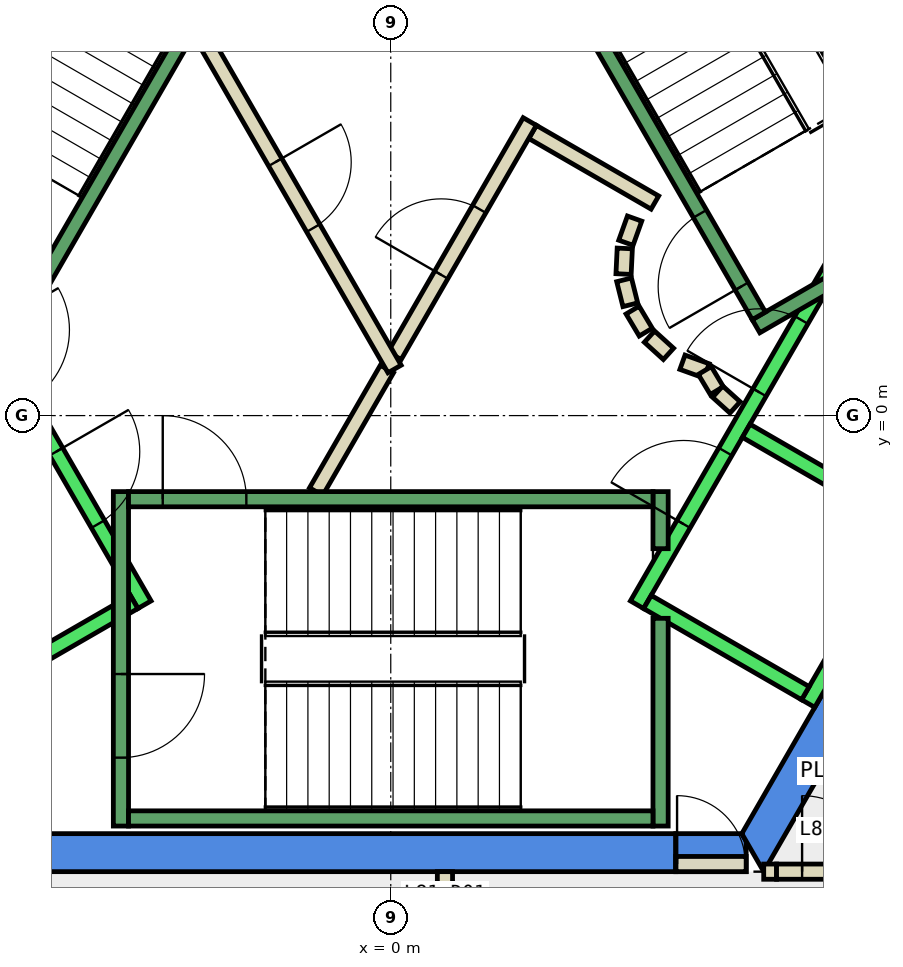
"""IFC4 building model, lengths in metres.
Left out: names, types, materials, properties, quantities, classifications, styles, units other than length and angle.
Written with IfcOpenShell. Run it as: python <this file> out.ifc"""

import sys

from ifc_helpers import new_model, si_unit, direction, frame, frame_2d, origin, place, context, subcontext, project, spatial, polyline, rectangle, outline, extrude, element, fill, save


model = new_model("IFC4")
c1 = context("Model", 3, precision=1e-05, world=origin(), true_north=direction((0.0, 1.0)))
c2 = subcontext(c1, "Body", "Model", "MODEL_VIEW")
j1 = project(units=[si_unit("LENGTHUNIT", "METRE"), si_unit("PLANEANGLEUNIT", "RADIAN")], contexts=[c1])
p1 = place(None, origin())
s1 = spatial("IfcSite", under=j1, at=p1, CompositionType="ELEMENT")
p2 = place(p1, origin())
s2 = spatial("IfcBuilding", under=s1, at=p2, CompositionType="ELEMENT")
p3 = place(p2, frame((0.0, 0.0, 344.9)))
s3 = spatial("IfcBuildingStorey", under=s2, at=p3, CompositionType="ELEMENT", Elevation=344.9)
p4 = place(p3, frame((0.0, 0.0, -0.35)))
e1 = element("IfcWall", 1, at=p4, inside=s3, PredefinedType="SHEAR", context=c2, shape_type="SweptSolid", body=[
    extrude(outline(polyline([(5.486, 9.998), (5.053, 9.748), (9.238, 2.5), (9.815, 2.5), (5.486, 9.998)])), origin(), (0.0, 0.0, 1.0), 4.4),
])
p5 = place(p3, frame((0.0, 0.0, -0.35)))
e2 = element("IfcWall", 2, at=p5, inside=s3, PredefinedType="SHEAR", context=c2, shape_type="SweptSolid", body=[
    extrude(outline(polyline([(3.75, -6.0), (3.75, -5.5), (-4.619, -5.5), (-4.907, -6.0), (3.75, -6.0)])), origin(), (0.0, 0.0, 1.0), 4.4),
])
p6 = place(p3, frame((0.0, 0.0, 3.6)))
e3 = element("IfcWall", 3, at=p6, inside=s3, PredefinedType="SHEAR", context=c2, shape_type="SweptSolid", body=[
    extrude(outline(polyline([(4.676, -6.0), (4.676, -5.6), (4.619, -5.5), (3.75, -5.5), (3.75, -6.0), (4.676, -6.0)])), origin(), (0.0, 0.0, 1.0), 0.45),
])
p7 = place(p3, frame((0.0, 0.0, -0.35)))
e4 = element("IfcWall", 4, at=p7, inside=s3, PredefinedType="SHEAR", context=c2, shape_type="SweptSolid", body=[
    extrude(outline(polyline([(4.907, -6.0), (9.815, 2.5), (9.238, 2.5), (4.619, -5.5), (4.907, -6.0)])), origin(), (0.0, 0.0, 1.0), 4.4),
])
p8 = place(p3, frame((-0.982, -1.0, 0.0), z_axis=(0.0, 0.0, 1.0), x_axis=(0.50024047865, 0.865886518847, 0.0)))
e5 = element("IfcWall", 5, at=p8, inside=s3, PredefinedType="PARTITIONING", context=c2, shape_type="SweptSolid", body=[
    extrude(rectangle(XDim=1.863, YDim=0.2, at=frame_2d((0.931, 0.0))), origin(), (0.0, 0.0, 1.0), 4.05),
])
p9 = place(p3, frame((1.866, 3.732, 0.0), z_axis=(0.0, 0.0, 1.0), x_axis=(0.866043361281, -0.499968895414, 0.0)))
e6 = element("IfcWall", 6, at=p9, inside=s3, PredefinedType="PARTITIONING", context=c2, shape_type="SweptSolid", body=[
    extrude(rectangle(XDim=1.858, YDim=0.2, at=frame_2d((0.929, 0.0))), origin(), (0.0, 0.0, 1.0), 4.05),
])
p10 = place(p3, frame((3.208, 2.592, 0.0), z_axis=(0.0, 0.0, 1.0), x_axis=(-0.337388820924, -0.941365382578, 0.0)))
e7 = element("IfcWall", 7, at=p10, inside=s3, PredefinedType="PARTITIONING", context=c2, shape_type="SweptSolid", body=[
    extrude(rectangle(XDim=0.338, YDim=0.2, at=frame_2d((0.169, 0.0))), origin(), (0.0, 0.0, 1.0), 4.05),
])
p11 = place(p3, frame((3.079, 2.199, 0.0), z_axis=(0.0, 0.0, 1.0), x_axis=(-0.047771483479, -0.998858290933, 0.0)))
e8 = element("IfcWall", 8, at=p11, inside=s3, PredefinedType="PARTITIONING", context=c2, shape_type="SweptSolid", body=[
    extrude(rectangle(XDim=0.337, YDim=0.2, at=frame_2d((0.169, 0.0))), origin(), (0.0, 0.0, 1.0), 4.05),
])
p12 = place(p3, frame((3.07, 1.786, 0.0), z_axis=(0.0, 0.0, 1.0), x_axis=(0.242705583207, -0.970099994784, 0.0)))
e9 = element("IfcWall", 9, at=p12, inside=s3, PredefinedType="PARTITIONING", context=c2, shape_type="SweptSolid", body=[
    extrude(rectangle(XDim=0.338, YDim=0.2, at=frame_2d((0.169, 0.0))), origin(), (0.0, 0.0, 1.0), 4.05),
])
for number, where, z_axis, x_axis in (
    (10, (3.182, 1.388, 0.0), (0.0, 0.0, 1.0), (0.512, -0.859, 0.0)),
    (11, (3.404, 1.039, 0.0), (0.0, 0.0, 1.0), (0.74, -0.672, 0.0)),
):
    element("IfcWall", number, at=place(p3, frame(where, z_axis=z_axis, x_axis=x_axis)), inside=s3, PredefinedType="PARTITIONING", context=c2, shape_type="SweptSolid", body=[
        extrude(rectangle(XDim=0.338, YDim=0.2, at=frame_2d((0.169, 0.0))), origin(), (0.0, 0.0, 1.0), 4.05),
    ])
p13 = place(p3, frame((3.838, 0.702, 0.0), z_axis=(0.0, 0.0, 1.0), x_axis=(0.941035081519, -0.338308993895, 0.0)))
e12 = element("IfcWall", 12, at=p13, inside=s3, PredefinedType="PARTITIONING", context=c2, shape_type="SweptSolid", body=[
    extrude(rectangle(XDim=0.337, YDim=0.2, at=frame_2d((0.168, 0.0))), origin(), (0.0, 0.0, 1.0), 4.05),
])
p14 = place(p3, frame((4.132, 0.593, 0.0), z_axis=(0.0, 0.0, 1.0), x_axis=(0.513561617048, -0.858052717201, 0.0)))
e13 = element("IfcWall", 13, at=p14, inside=s3, PredefinedType="PARTITIONING", context=c2, shape_type="SweptSolid", body=[
    extrude(rectangle(XDim=0.308, YDim=0.2, at=frame_2d((0.154, 0.0))), origin(), (0.0, 0.0, 1.0), 4.05),
])
p15 = place(p3, frame((4.301, 0.315, 0.0), z_axis=(0.0, 0.0, 1.0), x_axis=(0.741798017506, -0.670623367639, 0.0)))
e14 = element("IfcWall", 14, at=p15, inside=s3, PredefinedType="PARTITIONING", context=c2, shape_type="SweptSolid", body=[
    extrude(rectangle(XDim=0.309, YDim=0.2, at=frame_2d((0.154, 0.0))), origin(), (0.0, 0.0, 1.0), 4.05),
])
p16 = place(p3, frame((0.05, 0.787, 0.0), z_axis=(0.0, 0.0, 1.0), x_axis=(0.499954076797, 0.866051915934, 0.0)))
e15 = element("IfcWall", 15, at=p16, inside=s3, PredefinedType="PARTITIONING", context=c2, shape_type="SweptSolid", body=[
    extrude(rectangle(XDim=3.558, YDim=0.2, at=frame_2d((1.779, 0.0))), origin(), (0.0, 0.0, 1.0), 4.05),
])
p17 = place(p16, frame((1.229, 0.0, 0.0)))
e16 = element("IfcOpeningElement", 16, at=p17, cuts=e15, PredefinedType="OPENING", context=c2, shape_type="SweptSolid", body=[
    extrude(rectangle(XDim=1.0, YDim=2.1, at=frame_2d((0.5, 1.05))), frame((0.0, 0.11, 0.0), z_axis=(0.0, -1.0, 0.0), x_axis=(1.0, 0.0, 0.0)), (0.0, 0.0, 1.0), 0.22),
])
p18 = place(p3, frame((-2.54, 5.1, 0.0), z_axis=(0.0, 0.0, 1.0), x_axis=(0.499925051871, -0.866068670783, 0.0)))
e17 = element("IfcWall", 17, at=p18, inside=s3, PredefinedType="PARTITIONING", context=c2, shape_type="SweptSolid", body=[
    extrude(rectangle(XDim=5.181, YDim=0.2, at=frame_2d((2.59, 0.0))), origin(), (0.0, 0.0, 1.0), 4.05),
])
p19 = place(p18, frame((2.04, 0.0, 0.0)))
e18 = element("IfcOpeningElement", 18, at=p19, cuts=e17, PredefinedType="OPENING", context=c2, shape_type="SweptSolid", body=[
    extrude(rectangle(XDim=1.0, YDim=2.1, at=frame_2d((0.5, 1.05))), frame((0.0, 0.11, 0.0), z_axis=(0.0, -1.0, 0.0), x_axis=(1.0, 0.0, 0.0)), (0.0, 0.0, 1.0), 0.22),
])
p20 = place(p3, frame((0.713, -7.9, 0.0), z_axis=(0.0, 0.0, 1.0), x_axis=(0.0, 1.0, 0.0)))
e19 = element("IfcWall", 19, at=p20, inside=s3, PredefinedType="PARTITIONING", context=c2, shape_type="SweptSolid", body=[
    extrude(rectangle(XDim=1.9, YDim=0.2, at=frame_2d((0.95, 0.0))), origin(), (0.0, 0.0, 1.0), 4.05),
])
p21 = place(p20, frame((0.3, 0.0, 0.0)))
e20 = element("IfcOpeningElement", 20, at=p21, cuts=e19, PredefinedType="OPENING", context=c2, shape_type="SweptSolid", body=[
    extrude(rectangle(XDim=1.0, YDim=2.1, at=frame_2d((0.5, 1.05))), frame((0.0, 0.11, 0.0), z_axis=(0.0, -1.0, 0.0), x_axis=(1.0, 0.0, 0.0)), (0.0, 0.0, 1.0), 0.22),
])
p22 = place(p3, frame((4.907, -6.0, 0.0), z_axis=(0.0, 0.0, 1.0), x_axis=(1.0, 0.0, 0.0)))
e21 = element("IfcWall", 21, at=p22, inside=s3, PredefinedType="PARTITIONING", context=c2, shape_type="SweptSolid", body=[
    extrude(rectangle(XDim=0.169, YDim=0.2, at=frame_2d((0.084, 0.0))), origin(), (0.0, 0.0, 1.0), 2.4),
])
p23 = place(p3, frame((3.75, -5.9, 0.0), z_axis=(0.0, 0.0, 1.0), x_axis=(1.0, 0.0, 0.0)))
e22 = element("IfcWall", 22, at=p23, inside=s3, PredefinedType="PARTITIONING", context=c2, shape_type="SweptSolid", body=[
    extrude(rectangle(XDim=0.926, YDim=0.2, at=frame_2d((0.463, 0.0))), origin(), (0.0, 0.0, 1.0), 2.4),
])
p24 = place(p23, frame((0.017, 0.0, 0.0)))
e23 = element("IfcOpeningElement", 23, at=p24, cuts=e22, PredefinedType="OPENING", context=c2, shape_type="SweptSolid", body=[
    extrude(rectangle(XDim=0.9, YDim=2.1, at=frame_2d((0.45, 1.05))), frame((0.0, 0.11, 0.0), z_axis=(0.0, -1.0, 0.0), x_axis=(1.0, 0.0, 0.0)), (0.0, 0.0, 1.0), 0.22),
])
p25 = place(p3, frame((5.076, -6.0, 0.0), z_axis=(0.0, 0.0, 1.0), x_axis=(1.0, 0.0, 0.0)))
e24 = element("IfcWall", 24, at=p25, inside=s3, PredefinedType="PARTITIONING", context=c2, shape_type="SweptSolid", body=[
    extrude(rectangle(XDim=1.887, YDim=0.2, at=frame_2d((0.943, 0.0))), origin(), (0.0, 0.0, 1.0), 4.05),
])
p26 = place(p25, frame((0.336, 0.0, 0.0)))
e25 = element("IfcOpeningElement", 25, at=p26, cuts=e24, PredefinedType="OPENING", context=c2, shape_type="SweptSolid", body=[
    extrude(rectangle(XDim=1.0, YDim=2.1, at=frame_2d((0.5, 1.05))), frame((0.0, 0.11, 0.0), z_axis=(0.0, -1.0, 0.0), x_axis=(1.0, 0.0, 0.0)), (0.0, 0.0, 1.0), 0.22),
])
p27 = place(p3, frame((-5.94, 2.188, 0.0), z_axis=(0.0, 0.0, 1.0), x_axis=(0.500034260056, -0.866005622828, 0.0)))
e26 = element("IfcWall", 26, at=p27, inside=s3, PredefinedType="STANDARD", context=c2, shape_type="SweptSolid", body=[
    extrude(rectangle(XDim=5.399, YDim=0.2, at=frame_2d((2.7, 0.0))), origin(), (0.0, 0.0, 1.0), 4.05),
])
p28 = place(p27, frame((3.075, 0.0, 0.0)))
e27 = element("IfcOpeningElement", 27, at=p28, cuts=e26, PredefinedType="OPENING", context=c2, shape_type="SweptSolid", body=[
    extrude(rectangle(XDim=1.1, YDim=2.1, at=frame_2d((0.55, 1.05))), frame((0.0, 0.11, 0.0), z_axis=(0.0, -1.0, 0.0), x_axis=(1.0, 0.0, 0.0)), (0.0, 0.0, 1.0), 0.22),
])
p29 = place(p27, frame((1.225, 0.0, 0.0)))
e28 = element("IfcOpeningElement", 28, at=p29, cuts=e26, PredefinedType="OPENING", context=c2, shape_type="SweptSolid", body=[
    extrude(rectangle(XDim=1.1, YDim=2.1, at=frame_2d((0.55, 1.05))), frame((0.0, 0.11, 0.0), z_axis=(0.0, -1.0, 0.0), x_axis=(1.0, 0.0, 0.0)), (0.0, 0.0, 1.0), 0.22),
])
p30 = place(p3, frame((-3.377, -2.452, 0.0), z_axis=(0.0, 0.0, 1.0), x_axis=(-0.865955154139, -0.50012165622, 0.0)))
e29 = element("IfcWall", 29, at=p30, inside=s3, PredefinedType="STANDARD", context=c2, shape_type="SweptSolid", body=[
    extrude(rectangle(XDim=2.4, YDim=0.2, at=frame_2d((1.2, 0.0))), origin(), (0.0, 0.0, 1.0), 4.05),
])
p31 = place(p3, frame((3.24, -2.488, 0.0), z_axis=(0.0, 0.0, 1.0), x_axis=(0.500034260056, 0.866005622828, 0.0)))
e30 = element("IfcWall", 30, at=p31, inside=s3, PredefinedType="STANDARD", context=c2, shape_type="SweptSolid", body=[
    extrude(rectangle(XDim=5.399, YDim=0.2, at=frame_2d((2.7, 0.0))), origin(), (0.0, 0.0, 1.0), 4.05),
])
p32 = place(p31, frame((3.225, 0.0, 0.0)))
e31 = element("IfcOpeningElement", 31, at=p32, cuts=e30, PredefinedType="OPENING", context=c2, shape_type="SweptSolid", body=[
    extrude(rectangle(XDim=1.1, YDim=2.1, at=frame_2d((0.55, 1.05))), frame((0.0, 0.11, 0.0), z_axis=(0.0, -1.0, 0.0), x_axis=(1.0, 0.0, 0.0)), (0.0, 0.0, 1.0), 0.22),
])
p33 = place(p31, frame((1.225, 0.0, 0.0)))
e32 = element("IfcOpeningElement", 32, at=p33, cuts=e30, PredefinedType="OPENING", context=c2, shape_type="SweptSolid", body=[
    extrude(rectangle(XDim=1.1, YDim=2.1, at=frame_2d((0.55, 1.05))), frame((0.0, 0.11, 0.0), z_axis=(0.0, -1.0, 0.0), x_axis=(1.0, 0.0, 0.0)), (0.0, 0.0, 1.0), 0.22),
])
p34 = place(p3, frame((5.492, -3.788, 0.0), z_axis=(0.0, 0.0, 1.0), x_axis=(0.500034260056, 0.866005622828, 0.0)))
e33 = element("IfcWall", 33, at=p34, inside=s3, PredefinedType="STANDARD", context=c2, shape_type="SweptSolid", body=[
    extrude(rectangle(XDim=5.399, YDim=0.2, at=frame_2d((2.7, 0.0))), origin(), (0.0, 0.0, 1.0), 4.05),
])
p35 = place(p3, frame((3.377, -2.452, 0.0), z_axis=(0.0, 0.0, 1.0), x_axis=(0.865955154139, -0.50012165622, 0.0)))
e34 = element("IfcWall", 34, at=p35, inside=s3, PredefinedType="STANDARD", context=c2, shape_type="SweptSolid", body=[
    extrude(rectangle(XDim=2.4, YDim=0.2, at=frame_2d((1.2, 0.0))), origin(), (0.0, 0.0, 1.0), 4.05),
])
p36 = place(p3, frame((4.677, -0.2, 0.0), z_axis=(0.0, 0.0, 1.0), x_axis=(0.865973769406, -0.500089422704, 0.0)))
e35 = element("IfcWall", 35, at=p36, inside=s3, PredefinedType="STANDARD", context=c2, shape_type="SweptSolid", body=[
    extrude(rectangle(XDim=2.399, YDim=0.2, at=frame_2d((1.2, 0.0))), origin(), (0.0, 0.0, 1.0), 4.05),
])
p37 = place(p3, frame((-3.55, -1.0, 0.0), z_axis=(0.0, 0.0, 1.0), x_axis=(0.0, -1.0, 0.0)))
e36 = element("IfcWall", 36, at=p37, inside=s3, PredefinedType="STANDARD", context=c2, shape_type="SweptSolid", body=[
    extrude(rectangle(XDim=4.4, YDim=0.2, at=frame_2d((2.2, 0.0))), origin(), (0.0, 0.0, 1.0), 4.05),
])
p38 = place(p37, frame((2.4, 0.0, 0.0)))
e37 = element("IfcOpeningElement", 37, at=p38, cuts=e36, PredefinedType="OPENING", context=c2, shape_type="SweptSolid", body=[
    extrude(rectangle(XDim=1.1, YDim=2.2, at=frame_2d((0.55, 1.1))), frame((0.0, 0.11, 0.0), z_axis=(0.0, -1.0, 0.0), x_axis=(1.0, 0.0, 0.0)), (0.0, 0.0, 1.0), 0.22),
])
p39 = place(p3, frame((3.55, -2.667, 0.0), z_axis=(0.0, 0.0, 1.0), x_axis=(0.0, -1.0, 0.0)))
e38 = element("IfcWall", 38, at=p39, inside=s3, PredefinedType="STANDARD", context=c2, shape_type="SweptSolid", body=[
    extrude(rectangle(XDim=2.733, YDim=0.2, at=frame_2d((1.366, 0.0))), origin(), (0.0, 0.0, 1.0), 4.05),
])
p40 = place(p3, frame((3.55, -1.0, 0.0), z_axis=(0.0, 0.0, 1.0), x_axis=(0.0, -1.0, 0.0)))
e39 = element("IfcWall", 39, at=p40, inside=s3, PredefinedType="STANDARD", context=c2, shape_type="SweptSolid", body=[
    extrude(rectangle(XDim=0.751, YDim=0.2, at=frame_2d((0.375, 0.0))), origin(), (0.0, 0.0, 1.0), 4.05),
])
p41 = place(p3, frame((-3.45, -1.1, 0.0), z_axis=(0.0, 0.0, 1.0), x_axis=(1.0, 0.0, 0.0)))
e40 = element("IfcWall", 40, at=p41, inside=s3, PredefinedType="STANDARD", context=c2, shape_type="SweptSolid", body=[
    extrude(rectangle(XDim=6.9, YDim=0.2, at=frame_2d((3.45, 0.0))), origin(), (0.0, 0.0, 1.0), 4.05),
])
p42 = place(p41, frame((0.45, 0.0, 0.0)))
e41 = element("IfcOpeningElement", 41, at=p42, cuts=e40, PredefinedType="OPENING", context=c2, shape_type="SweptSolid", body=[
    extrude(rectangle(XDim=1.1, YDim=2.2, at=frame_2d((0.55, 1.1))), frame((0.0, 0.11, 0.0), z_axis=(0.0, -1.0, 0.0), x_axis=(1.0, 0.0, 0.0)), (0.0, 0.0, 1.0), 0.22),
])
p43 = place(p3, frame((-3.45, -5.3, 0.0), z_axis=(0.0, 0.0, 1.0), x_axis=(1.0, 0.0, 0.0)))
e42 = element("IfcWall", 42, at=p43, inside=s3, PredefinedType="STANDARD", context=c2, shape_type="SweptSolid", body=[
    extrude(rectangle(XDim=6.9, YDim=0.2, at=frame_2d((3.45, 0.0))), origin(), (0.0, 0.0, 1.0), 4.05),
])
p44 = place(p3, frame((4.806, 1.176, 0.0), z_axis=(0.0, 0.0, 1.0), x_axis=(0.866059941101, 0.499940174841, 0.0)))
e43 = element("IfcWall", 43, at=p44, inside=s3, PredefinedType="STANDARD", context=c2, shape_type="SweptSolid", body=[
    extrude(rectangle(XDim=4.4, YDim=0.2, at=frame_2d((2.2, 0.0))), origin(), (0.0, 0.0, 1.0), 4.05),
])
p45 = place(p44, frame((2.4, 0.0, 0.0)))
e44 = element("IfcOpeningElement", 44, at=p45, cuts=e43, PredefinedType="OPENING", context=c2, shape_type="SweptSolid", body=[
    extrude(rectangle(XDim=1.1, YDim=2.2, at=frame_2d((0.55, 1.1))), frame((0.0, 0.11, 0.0), z_axis=(0.0, -1.0, 0.0), x_axis=(1.0, 0.0, 0.0)), (0.0, 0.0, 1.0), 0.22),
])
p46 = place(p3, frame((4.843, 1.312, 0.0), z_axis=(0.0, 0.0, 1.0), x_axis=(-0.499963383562, 0.866046543262, 0.0)))
e45 = element("IfcWall", 45, at=p46, inside=s3, PredefinedType="STANDARD", context=c2, shape_type="SweptSolid", body=[
    extrude(rectangle(XDim=6.9, YDim=0.2, at=frame_2d((3.45, 0.0))), origin(), (0.0, 0.0, 1.0), 4.05),
])
p47 = place(p46, frame((0.45, 0.0, 0.0)))
e46 = element("IfcOpeningElement", 46, at=p47, cuts=e45, PredefinedType="OPENING", context=c2, shape_type="SweptSolid", body=[
    extrude(rectangle(XDim=1.1, YDim=2.2, at=frame_2d((0.55, 1.1))), frame((0.0, 0.11, 0.0), z_axis=(0.0, -1.0, 0.0), x_axis=(1.0, 0.0, 0.0)), (0.0, 0.0, 1.0), 0.22),
])
p48 = place(p3, frame((8.48, 3.412, 0.0), z_axis=(0.0, 0.0, 1.0), x_axis=(-0.499978703459, 0.866037698999, 0.0)))
e47 = element("IfcWall", 47, at=p48, inside=s3, PredefinedType="STANDARD", context=c2, shape_type="SweptSolid", body=[
    extrude(rectangle(XDim=6.9, YDim=0.2, at=frame_2d((3.45, 0.0))), origin(), (0.0, 0.0, 1.0), 4.05),
])
p49 = place(p3, frame((-1.393, 7.288, 0.0), z_axis=(0.0, 0.0, 1.0), x_axis=(-0.499963383562, -0.866046543262, 0.0)))
e48 = element("IfcWall", 48, at=p49, inside=s3, PredefinedType="STANDARD", context=c2, shape_type="SweptSolid", body=[
    extrude(rectangle(XDim=6.9, YDim=0.2, at=frame_2d((3.45, 0.0))), origin(), (0.0, 0.0, 1.0), 4.05),
])
p50 = place(p49, frame((0.45, 0.0, 0.0)))
e49 = element("IfcOpeningElement", 49, at=p50, cuts=e48, PredefinedType="OPENING", context=c2, shape_type="SweptSolid", body=[
    extrude(rectangle(XDim=1.1, YDim=2.2, at=frame_2d((0.55, 1.1))), frame((0.0, 0.11, 0.0), z_axis=(0.0, -1.0, 0.0), x_axis=(1.0, 0.0, 0.0)), (0.0, 0.0, 1.0), 0.22),
])
p51 = place(p26, origin())
e50 = element("IfcDoor", 50, at=p51, inside=s3, OperationType="SINGLE_SWING_RIGHT", PredefinedType="DOOR", context=c2, shape_type="SweptSolid", body=[
    extrude(rectangle(XDim=1.0, YDim=2.1, at=frame_2d((0.5, 1.05))), frame((0.0, 0.025, 0.0), z_axis=(0.0, -1.0, 0.0), x_axis=(1.0, 0.0, 0.0)), (0.0, 0.0, 1.0), 0.05),
])
fill(e25, e50)
p52 = place(p17, origin())
e51 = element("IfcDoor", 51, at=p52, inside=s3, OperationType="SINGLE_SWING_RIGHT", PredefinedType="DOOR", context=c2, shape_type="SweptSolid", body=[
    extrude(rectangle(XDim=1.0, YDim=2.1, at=frame_2d((0.5, 1.05))), frame((0.0, 0.025, 0.0), z_axis=(0.0, -1.0, 0.0), x_axis=(1.0, 0.0, 0.0)), (0.0, 0.0, 1.0), 0.05),
])
fill(e16, e51)
p53 = place(p19, origin())
e52 = element("IfcDoor", 52, at=p53, inside=s3, OperationType="SINGLE_SWING_RIGHT", PredefinedType="DOOR", context=c2, shape_type="SweptSolid", body=[
    extrude(rectangle(XDim=1.0, YDim=2.1, at=frame_2d((0.5, 1.05))), frame((0.0, 0.025, 0.0), z_axis=(0.0, -1.0, 0.0), x_axis=(1.0, 0.0, 0.0)), (0.0, 0.0, 1.0), 0.05),
])
fill(e18, e52)
p54 = place(p24, origin())
e53 = element("IfcDoor", 53, at=p54, inside=s3, OperationType="SINGLE_SWING_LEFT", PredefinedType="DOOR", context=c2, shape_type="SweptSolid", body=[
    extrude(rectangle(XDim=0.9, YDim=2.1, at=frame_2d((0.45, 1.05))), frame((0.0, 0.025, 0.0), z_axis=(0.0, -1.0, 0.0), x_axis=(1.0, 0.0, 0.0)), (0.0, 0.0, 1.0), 0.05),
])
fill(e23, e53)
p55 = place(p32, origin())
e54 = element("IfcDoor", 54, at=p55, inside=s3, OperationType="SLIDING_TO_LEFT", PredefinedType="DOOR", context=c2, shape_type="SweptSolid", body=[
    extrude(rectangle(XDim=1.1, YDim=2.1, at=frame_2d((0.55, 1.05))), frame((0.0, 0.025, 0.0), z_axis=(0.0, -1.0, 0.0), x_axis=(1.0, 0.0, 0.0)), (0.0, 0.0, 1.0), 0.05),
])
fill(e31, e54)
p56 = place(p28, origin())
e55 = element("IfcDoor", 55, at=p56, inside=s3, OperationType="SLIDING_TO_LEFT", PredefinedType="DOOR", context=c2, shape_type="SweptSolid", body=[
    extrude(rectangle(XDim=1.1, YDim=2.1, at=frame_2d((0.55, 1.05))), frame((0.0, 0.025, 0.0), z_axis=(0.0, -1.0, 0.0), x_axis=(1.0, 0.0, 0.0)), (0.0, 0.0, 1.0), 0.05),
])
fill(e27, e55)
p57 = place(p33, origin())
e56 = element("IfcDoor", 56, at=p57, inside=s3, OperationType="SLIDING_TO_LEFT", PredefinedType="DOOR", context=c2, shape_type="SweptSolid", body=[
    extrude(rectangle(XDim=1.1, YDim=2.1, at=frame_2d((0.55, 1.05))), frame((0.0, 0.025, 0.0), z_axis=(0.0, -1.0, 0.0), x_axis=(1.0, 0.0, 0.0)), (0.0, 0.0, 1.0), 0.05),
])
fill(e32, e56)
p58 = place(p42, origin())
e57 = element("IfcDoor", 57, at=p58, inside=s3, OperationType="SINGLE_SWING_LEFT", PredefinedType="DOOR", context=c2, shape_type="SweptSolid", body=[
    extrude(rectangle(XDim=1.1, YDim=2.2, at=frame_2d((0.55, 1.1))), frame((0.0, 0.025, 0.0), z_axis=(0.0, -1.0, 0.0), x_axis=(1.0, 0.0, 0.0)), (0.0, 0.0, 1.0), 0.05),
])
fill(e41, e57)
p59 = place(p38, origin())
e58 = element("IfcDoor", 58, at=p59, inside=s3, OperationType="SINGLE_SWING_LEFT", PredefinedType="DOOR", context=c2, shape_type="SweptSolid", body=[
    extrude(rectangle(XDim=1.1, YDim=2.2, at=frame_2d((0.55, 1.1))), frame((0.0, 0.025, 0.0), z_axis=(0.0, -1.0, 0.0), x_axis=(1.0, 0.0, 0.0)), (0.0, 0.0, 1.0), 0.05),
])
fill(e37, e58)
p60 = place(p47, origin())
e59 = element("IfcDoor", 59, at=p60, inside=s3, OperationType="SINGLE_SWING_LEFT", PredefinedType="DOOR", context=c2, shape_type="SweptSolid", body=[
    extrude(rectangle(XDim=1.1, YDim=2.2, at=frame_2d((0.55, 1.1))), frame((0.0, 0.025, 0.0), z_axis=(0.0, -1.0, 0.0), x_axis=(1.0, 0.0, 0.0)), (0.0, 0.0, 1.0), 0.05),
])
fill(e46, e59)
save(model, sys.argv[1])
